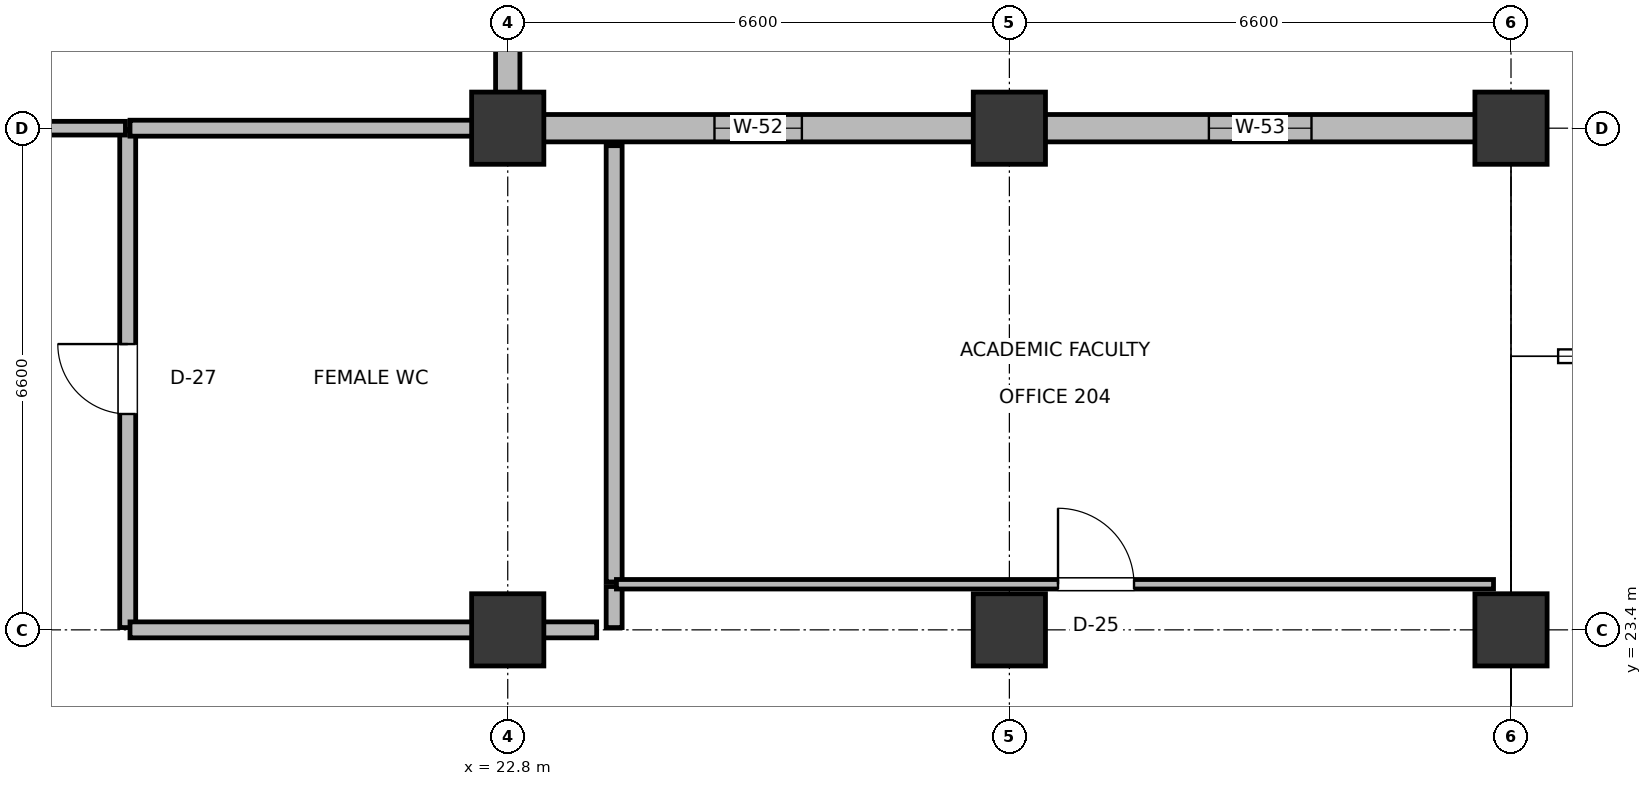
"""IFC4 building model, lengths in metres.
Left out: names, types, materials, properties, quantities, classifications, styles, units other than length and angle.
Written with IfcOpenShell. Run it as: python <this file> out.ifc"""

import sys

from ifc_helpers import new_model, si_unit, direction, frame, frame_2d, origin, origin_2d, place, context, subcontext, project, spatial, rectangle, extrude, element, fill, save


model = new_model("IFC4")
c1 = context("Model", 3, precision=1e-05, world=origin(), true_north=direction((0.0, 1.0)))
c2 = subcontext(c1, "Body", "Model", "MODEL_VIEW")
j1 = project(units=[si_unit("LENGTHUNIT", "METRE"), si_unit("PLANEANGLEUNIT", "RADIAN")], contexts=[c1])
p1 = place(None, origin())
s1 = spatial("IfcSite", under=j1, at=p1, CompositionType="ELEMENT")
p2 = place(p1, origin())
s2 = spatial("IfcBuilding", under=s1, at=p2, CompositionType="ELEMENT")
p3 = place(p2, frame((0.0, 0.0, 10.2)))
s3 = spatial("IfcBuildingStorey", under=s2, at=p3, CompositionType="ELEMENT", Elevation=10.2)
for number, where, z_axis, x_axis in (
    (1, (22.8, 23.4, 0.0), (0.0, 0.0, 1.0), (1.0, 0.0, 0.0)),
    (2, (22.8, 30.0, 0.0), (0.0, 0.0, 1.0), (1.0, 0.0, 0.0)),
    (3, (29.4, 23.4, 0.0), (0.0, 0.0, 1.0), (1.0, 0.0, 0.0)),
    (4, (29.4, 30.0, 0.0), (0.0, 0.0, 1.0), (1.0, 0.0, 0.0)),
    (5, (36.0, 23.4, 0.0), (0.0, 0.0, 1.0), (1.0, 0.0, 0.0)),
    (6, (36.0, 30.0, 0.0), (0.0, 0.0, 1.0), (1.0, 0.0, 0.0)),
):
    element("IfcColumn", number, at=place(p3, frame(where, z_axis=z_axis, x_axis=x_axis)), inside=s3, PredefinedType="COLUMN", context=c2, shape_type="SweptSolid", body=[
        extrude(rectangle(XDim=0.95, YDim=0.95, at=origin_2d()), origin(), (0.0, 0.0, 1.0), 4.8),
    ])
p4 = place(p3, frame((23.255, 30.0, 0.0), z_axis=(0.0, 0.0, 1.0), x_axis=(1.0, 0.0, 0.0)))
e7 = element("IfcWall", 7, at=p4, inside=s3, PredefinedType="SOLIDWALL", context=c2, shape_type="SweptSolid", body=[
    extrude(rectangle(XDim=5.68, YDim=0.36, at=frame_2d((2.84, 0.0))), origin(), (0.0, 0.0, 1.0), 3.695),
])
p5 = place(p4, frame((2.265, 0.0, 0.9)))
e8 = element("IfcOpeningElement", 8, at=p5, cuts=e7, PredefinedType="OPENING", context=c2, shape_type="SweptSolid", body=[
    extrude(rectangle(XDim=1.15, YDim=1.75, at=frame_2d((0.575, 0.875))), frame((0.0, 0.19, 0.0), z_axis=(0.0, -1.0, 0.0), x_axis=(1.0, 0.0, 0.0)), (0.0, 0.0, 1.0), 0.38),
])
p6 = place(p3, frame((29.855, 30.0, 0.0), z_axis=(0.0, 0.0, 1.0), x_axis=(1.0, 0.0, 0.0)))
e9 = element("IfcWall", 9, at=p6, inside=s3, PredefinedType="SOLIDWALL", context=c2, shape_type="SweptSolid", body=[
    extrude(rectangle(XDim=5.69, YDim=0.36, at=frame_2d((2.845, 0.0))), origin(), (0.0, 0.0, 1.0), 3.825),
])
p7 = place(p6, frame((2.17, 0.0, 0.9)))
e10 = element("IfcOpeningElement", 10, at=p7, cuts=e9, PredefinedType="OPENING", context=c2, shape_type="SweptSolid", body=[
    extrude(rectangle(XDim=1.35, YDim=1.15, at=frame_2d((0.675, 0.575))), frame((0.0, 0.19, 0.0), z_axis=(0.0, -1.0, 0.0), x_axis=(1.0, 0.0, 0.0)), (0.0, 0.0, 1.0), 0.38),
])
p8 = place(p3, frame((22.8, 30.455, 0.0), z_axis=(0.0, 0.0, 1.0), x_axis=(0.0, 1.0, 0.0)))
e11 = element("IfcWall", 11, at=p8, inside=s3, PredefinedType="SOLIDWALL", context=c2, shape_type="SweptSolid", body=[
    extrude(rectangle(XDim=8.16, YDim=0.32, at=frame_2d((4.08, 0.0))), origin(), (0.0, 0.0, 1.0), 3.825),
])
p9 = place(p8, frame((3.605, 0.0, 0.9)))
e12 = element("IfcOpeningElement", 12, at=p9, cuts=e11, PredefinedType="OPENING", context=c2, shape_type="SweptSolid", body=[
    extrude(rectangle(XDim=0.95, YDim=1.55, at=frame_2d((0.475, 0.775))), frame((0.0, 0.17, 0.0), z_axis=(0.0, -1.0, 0.0), x_axis=(1.0, 0.0, 0.0)), (0.0, 0.0, 1.0), 0.34),
])
p10 = place(p3, frame((24.2, 24.03, 0.0), z_axis=(0.0, 0.0, 1.0), x_axis=(0.0, 1.0, 0.0)))
e13 = element("IfcWall", 13, at=p10, inside=s3, PredefinedType="PLUMBINGWALL", context=c2, shape_type="SweptSolid", body=[
    extrude(rectangle(XDim=5.74, YDim=0.21, at=frame_2d((2.87, 0.0))), origin(), (0.0, 0.0, 1.0), 3.695),
])
p11 = place(p3, frame((24.2, 23.43, 0.0), z_axis=(0.0, 0.0, 1.0), x_axis=(0.0, 1.0, 0.0)))
e14 = element("IfcWall", 14, at=p11, inside=s3, PredefinedType="PLUMBINGWALL", context=c2, shape_type="SweptSolid", body=[
    extrude(rectangle(XDim=0.54, YDim=0.21, at=frame_2d((0.27, 0.0))), origin(), (0.0, 0.0, 1.0), 3.825),
])
p12 = place(p3, frame((17.8, 23.43, 0.0), z_axis=(0.0, 0.0, 1.0), x_axis=(0.0, 1.0, 0.0)))
e15 = element("IfcWall", 15, at=p12, inside=s3, PredefinedType="PLUMBINGWALL", context=c2, shape_type="SweptSolid", body=[
    extrude(rectangle(XDim=6.54, YDim=0.21, at=frame_2d((3.27, 0.0))), origin(), (0.0, 0.0, 1.0), 3.555),
])
p13 = place(p12, frame((2.81, 0.0, 0.0)))
e16 = element("IfcOpeningElement", 16, at=p13, cuts=e15, PredefinedType="OPENING", context=c2, shape_type="SweptSolid", body=[
    extrude(rectangle(XDim=0.92, YDim=2.1, at=frame_2d((0.46, 1.05))), frame((0.0, 0.115, 0.0), z_axis=(0.0, -1.0, 0.0), x_axis=(1.0, 0.0, 0.0)), (0.0, 0.0, 1.0), 0.23),
])
p14 = place(p3, frame((17.83, 23.4, 0.0), z_axis=(0.0, 0.0, 1.0), x_axis=(1.0, 0.0, 0.0)))
e17 = element("IfcWall", 17, at=p14, inside=s3, PredefinedType="PLUMBINGWALL", context=c2, shape_type="SweptSolid", body=[
    extrude(rectangle(XDim=6.14, YDim=0.21, at=frame_2d((3.07, 0.0))), origin(), (0.0, 0.0, 1.0), 3.555),
])
p15 = place(p3, frame((17.83, 30.0, 0.0), z_axis=(0.0, 0.0, 1.0), x_axis=(1.0, 0.0, 0.0)))
e18 = element("IfcWall", 18, at=p15, inside=s3, PredefinedType="PLUMBINGWALL", context=c2, shape_type="SweptSolid", body=[
    extrude(rectangle(XDim=4.74, YDim=0.21, at=frame_2d((2.37, 0.0))), origin(), (0.0, 0.0, 1.0), 3.725),
])
p16 = place(p3, frame((24.23, 24.0, 0.0), z_axis=(0.0, 0.0, 1.0), x_axis=(1.0, 0.0, 0.0)))
e19 = element("IfcWall", 19, at=p16, inside=s3, PredefinedType="PARTITIONING", context=c2, shape_type="SweptSolid", body=[
    extrude(rectangle(XDim=11.54, YDim=0.125, at=frame_2d((5.77, 0.0))), origin(), (0.0, 0.0, 1.0), 3.905),
])
p17 = place(p16, frame((5.81, 0.0, 0.0)))
e20 = element("IfcOpeningElement", 20, at=p17, cuts=e19, PredefinedType="OPENING", context=c2, shape_type="SweptSolid", body=[
    extrude(rectangle(XDim=1.0, YDim=2.15, at=frame_2d((0.5, 1.075))), frame((0.0, 0.073, 0.0), z_axis=(0.0, -1.0, 0.0), x_axis=(1.0, 0.0, 0.0)), (0.0, 0.0, 1.0), 0.145),
])
p18 = place(p3, frame((13.43, 30.0, 0.0), z_axis=(0.0, 0.0, 1.0), x_axis=(1.0, 0.0, 0.0)))
e21 = element("IfcWall", 21, at=p18, inside=s3, PredefinedType="PARTITIONING", context=c2, shape_type="SweptSolid", body=[
    extrude(rectangle(XDim=4.34, YDim=0.18, at=frame_2d((2.17, 0.0))), origin(), (0.0, 0.0, 1.0), 3.655),
])
p19 = place(p18, frame((1.105, 0.0, 0.0)))
e22 = element("IfcOpeningElement", 22, at=p19, cuts=e21, PredefinedType="OPENING", context=c2, shape_type="SweptSolid", body=[
    extrude(rectangle(XDim=1.05, YDim=2.2, at=frame_2d((0.525, 1.1))), frame((0.0, 0.1, 0.0), z_axis=(0.0, -1.0, 0.0), x_axis=(1.0, 0.0, 0.0)), (0.0, 0.0, 1.0), 0.2),
])
p20 = place(p5, origin())
e23 = element("IfcWindow", 23, at=p20, inside=s3, PartitioningType="DOUBLE_PANEL_VERTICAL", PredefinedType="WINDOW", context=c2, shape_type="SweptSolid", body=[
    extrude(rectangle(XDim=1.15, YDim=1.75, at=frame_2d((0.575, 0.875))), frame((0.0, 0.03, 0.0), z_axis=(0.0, -1.0, 0.0), x_axis=(1.0, 0.0, 0.0)), (0.0, 0.0, 1.0), 0.06),
])
fill(e8, e23)
p21 = place(p7, origin())
e24 = element("IfcWindow", 24, at=p21, inside=s3, PartitioningType="DOUBLE_PANEL_VERTICAL", PredefinedType="WINDOW", context=c2, shape_type="SweptSolid", body=[
    extrude(rectangle(XDim=1.35, YDim=1.15, at=frame_2d((0.675, 0.575))), frame((0.0, 0.03, 0.0), z_axis=(0.0, -1.0, 0.0), x_axis=(1.0, 0.0, 0.0)), (0.0, 0.0, 1.0), 0.06),
])
fill(e10, e24)
p22 = place(p13, origin())
e25 = element("IfcDoor", 25, at=p22, inside=s3, OperationType="SINGLE_SWING_RIGHT", PredefinedType="DOOR", context=c2, shape_type="SweptSolid", body=[
    extrude(rectangle(XDim=0.92, YDim=2.1, at=frame_2d((0.46, 1.05))), frame((0.0, 0.025, 0.0), z_axis=(0.0, -1.0, 0.0), x_axis=(1.0, 0.0, 0.0)), (0.0, 0.0, 1.0), 0.05),
])
fill(e16, e25)
p23 = place(p17, origin())
e26 = element("IfcDoor", 26, at=p23, inside=s3, OperationType="SINGLE_SWING_LEFT", PredefinedType="DOOR", context=c2, shape_type="SweptSolid", body=[
    extrude(rectangle(XDim=1.0, YDim=2.15, at=frame_2d((0.5, 1.075))), frame((0.0, 0.025, 0.0), z_axis=(0.0, -1.0, 0.0), x_axis=(1.0, 0.0, 0.0)), (0.0, 0.0, 1.0), 0.05),
])
fill(e20, e26)
save(model, sys.argv[1])
